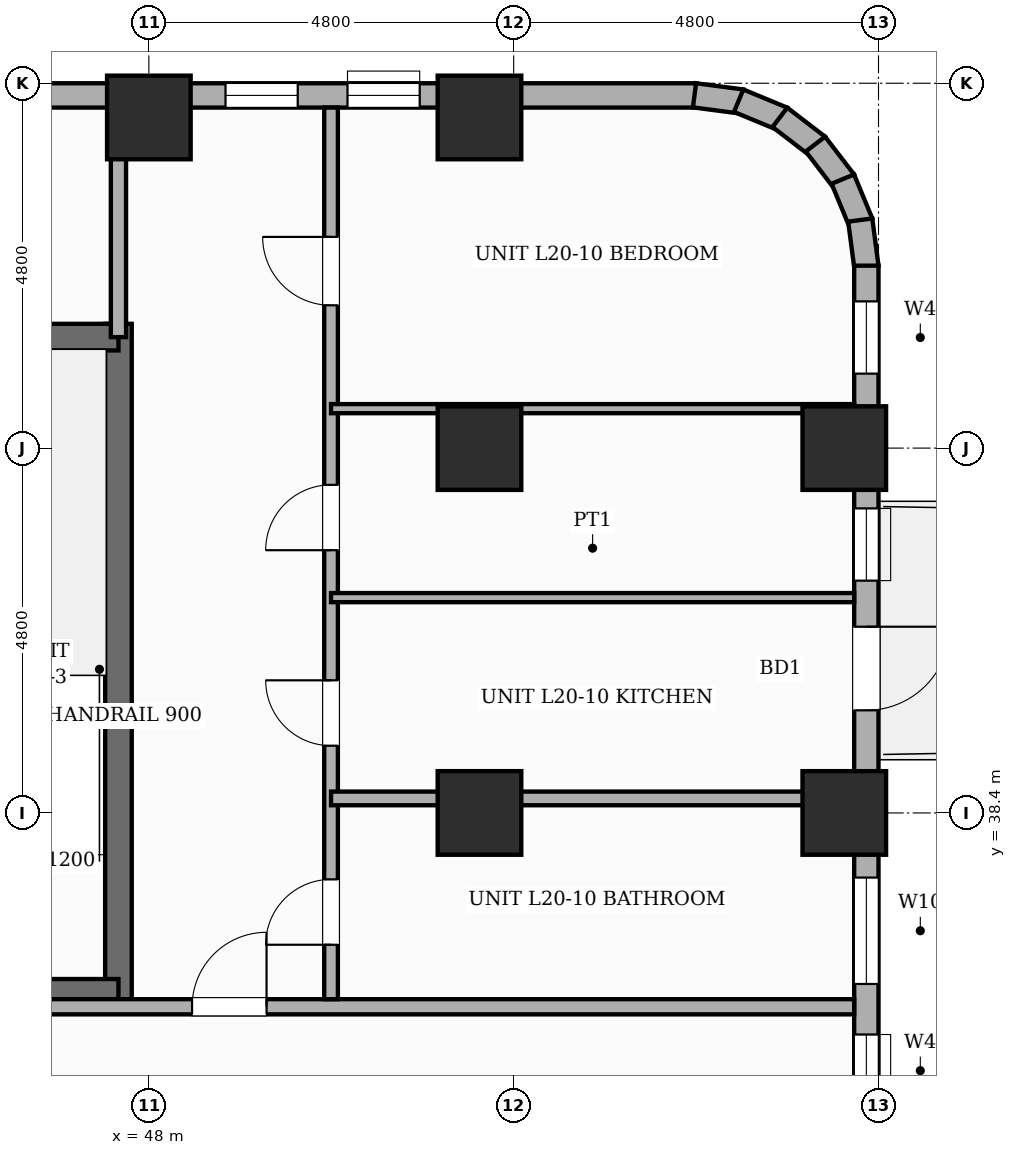
"""IFC4 building model, lengths in metres.
Left out: names, types, materials, properties, quantities, classifications, styles, units other than length and angle.
Written with IfcOpenShell. Run it as: python <this file> out.ifc"""

import sys

from ifc_helpers import new_model, si_unit, direction, frame, frame_2d, origin, origin_2d, place, context, subcontext, project, spatial, rectangle, extrude, element, fill, save


model = new_model("IFC4")
c1 = context("Model", 3, precision=1e-05, world=origin(), true_north=direction((0.0, 1.0)))
c2 = subcontext(c1, "Body", "Model", "MODEL_VIEW")
j1 = project(units=[si_unit("LENGTHUNIT", "METRE"), si_unit("PLANEANGLEUNIT", "RADIAN")], contexts=[c1])
p1 = place(None, origin())
s1 = spatial("IfcSite", under=j1, at=p1, CompositionType="ELEMENT")
p2 = place(p1, origin())
s2 = spatial("IfcBuilding", under=s1, at=p2, CompositionType="ELEMENT")
p3 = place(p2, frame((0.0, 0.0, 79.0)))
s3 = spatial("IfcBuildingStorey", under=s2, at=p3, CompositionType="ELEMENT", Elevation=79.0)
p4 = place(p3, frame((47.6, 35.865, 0.0), z_axis=(0.0, 0.0, 1.0), x_axis=(0.0, 1.0, 0.0)))
e1 = element("IfcWall", 1, at=p4, inside=s3, PredefinedType="SHEAR", context=c2, shape_type="SweptSolid", body=[
    extrude(rectangle(XDim=8.97, YDim=0.35, at=frame_2d((4.485, 0.0))), origin(), (0.0, 0.0, 1.0), 3.6),
])
for number, where, z_axis, x_axis in (
    (2, (44.02, 36.04, 0.0), (0.0, 0.0, 1.0), (1.0, 0.0, 0.0)),
    (3, (44.02, 44.66, 0.0), (0.0, 0.0, 1.0), (1.0, 0.0, 0.0)),
):
    element("IfcWall", number, at=place(p3, frame(where, z_axis=z_axis, x_axis=x_axis)), inside=s3, PredefinedType="SHEAR", context=c2, shape_type="SweptSolid", body=[
        extrude(rectangle(XDim=3.58, YDim=0.35, at=frame_2d((1.79, 0.0))), origin(), (0.0, 0.0, 1.0), 3.6),
    ])
for number, where, z_axis, x_axis in (
    (4, (48.0, 47.55, 0.0), (0.0, 0.0, 1.0), (1.0, 0.0, 0.0)),
    (5, (52.35, 38.4, 0.0), (0.0, 0.0, 1.0), (1.0, 0.0, 0.0)),
    (6, (52.35, 43.2, 0.0), (0.0, 0.0, 1.0), (1.0, 0.0, 0.0)),
    (7, (52.35, 47.55, 0.0), (0.0, 0.0, 1.0), (1.0, 0.0, 0.0)),
    (8, (57.15, 38.4, 0.0), (0.0, 0.0, 1.0), (1.0, 0.0, 0.0)),
    (9, (57.15, 43.2, 0.0), (0.0, 0.0, 1.0), (1.0, 0.0, 0.0)),
):
    element("IfcColumn", number, at=place(p3, frame(where, z_axis=z_axis, x_axis=x_axis)), inside=s3, PredefinedType="COLUMN", context=c2, shape_type="SweptSolid", body=[
        extrude(rectangle(XDim=1.1, YDim=1.1, at=origin_2d()), origin(), (0.0, 0.0, 1.0), 3.6),
    ])
p5 = place(p3, frame((7.2, 47.84, 0.0), z_axis=(0.0, 0.0, 1.0), x_axis=(1.0, 0.0, 0.0)))
e10 = element("IfcWall", 10, at=p5, inside=s3, PredefinedType="STANDARD", context=c2, shape_type="SweptSolid", body=[
    extrude(rectangle(XDim=48.0, YDim=0.32, at=frame_2d((24.0, 0.0))), origin(), (0.0, 0.0, 1.0), 2.53),
])
p6 = place(p5, frame((24.97, 0.0, 0.45)))
e11 = element("IfcOpeningElement", 11, at=p6, cuts=e10, PredefinedType="OPENING", context=c2, shape_type="SweptSolid", body=[
    extrude(rectangle(XDim=0.6, YDim=1.8, at=frame_2d((0.3, 0.9))), frame((0.0, 0.17, 0.0), z_axis=(0.0, -1.0, 0.0), x_axis=(1.0, 0.0, 0.0)), (0.0, 0.0, 1.0), 0.34),
])
p7 = place(p5, frame((29.44, 0.0, 0.45)))
e12 = element("IfcOpeningElement", 12, at=p7, cuts=e10, PredefinedType="OPENING", context=c2, shape_type="SweptSolid", body=[
    extrude(rectangle(XDim=0.95, YDim=1.8, at=frame_2d((0.475, 0.9))), frame((0.0, 0.17, 0.0), z_axis=(0.0, -1.0, 0.0), x_axis=(1.0, 0.0, 0.0)), (0.0, 0.0, 1.0), 0.34),
])
p8 = place(p5, frame((43.414, 0.0, 0.45)))
e13 = element("IfcOpeningElement", 13, at=p8, cuts=e10, PredefinedType="OPENING", context=c2, shape_type="SweptSolid", body=[
    extrude(rectangle(XDim=0.95, YDim=1.8, at=frame_2d((0.475, 0.9))), frame((0.0, 0.17, 0.0), z_axis=(0.0, -1.0, 0.0), x_axis=(1.0, 0.0, 0.0)), (0.0, 0.0, 1.0), 0.34),
])
p9 = place(p5, frame((18.74, 0.0, 0.45)))
e14 = element("IfcOpeningElement", 14, at=p9, cuts=e10, PredefinedType="OPENING", context=c2, shape_type="SweptSolid", body=[
    extrude(rectangle(XDim=0.95, YDim=1.8, at=frame_2d((0.475, 0.9))), frame((0.0, 0.17, 0.0), z_axis=(0.0, -1.0, 0.0), x_axis=(1.0, 0.0, 0.0)), (0.0, 0.0, 1.0), 0.34),
])
p10 = place(p5, frame((37.825, 0.0, 0.65)))
e15 = element("IfcOpeningElement", 15, at=p10, cuts=e10, PredefinedType="OPENING", context=c2, shape_type="SweptSolid", body=[
    extrude(rectangle(XDim=1.4, YDim=1.1, at=frame_2d((0.7, 0.55))), frame((0.0, 0.17, 0.0), z_axis=(0.0, -1.0, 0.0), x_axis=(1.0, 0.0, 0.0)), (0.0, 0.0, 1.0), 0.34),
])
p11 = place(p5, frame((0.47, 0.0, 0.45)))
e16 = element("IfcOpeningElement", 16, at=p11, cuts=e10, PredefinedType="OPENING", context=c2, shape_type="SweptSolid", body=[
    extrude(rectangle(XDim=0.95, YDim=1.8, at=frame_2d((0.475, 0.9))), frame((0.0, 0.17, 0.0), z_axis=(0.0, -1.0, 0.0), x_axis=(1.0, 0.0, 0.0)), (0.0, 0.0, 1.0), 0.34),
])
p12 = place(p5, frame((5.265, 0.0, 0.45)))
e17 = element("IfcOpeningElement", 17, at=p12, cuts=e10, PredefinedType="OPENING", context=c2, shape_type="SweptSolid", body=[
    extrude(rectangle(XDim=0.95, YDim=1.8, at=frame_2d((0.475, 0.9))), frame((0.0, 0.17, 0.0), z_axis=(0.0, -1.0, 0.0), x_axis=(1.0, 0.0, 0.0)), (0.0, 0.0, 1.0), 0.34),
])
p13 = place(p5, frame((22.87, 0.0, 0.65)))
e18 = element("IfcOpeningElement", 18, at=p13, cuts=e10, PredefinedType="OPENING", context=c2, shape_type="SweptSolid", body=[
    extrude(rectangle(XDim=1.4, YDim=1.1, at=frame_2d((0.7, 0.55))), frame((0.0, 0.17, 0.0), z_axis=(0.0, -1.0, 0.0), x_axis=(1.0, 0.0, 0.0)), (0.0, 0.0, 1.0), 0.34),
])
p14 = place(p5, frame((32.81, 0.0, 0.65)))
e19 = element("IfcOpeningElement", 19, at=p14, cuts=e10, PredefinedType="OPENING", context=c2, shape_type="SweptSolid", body=[
    extrude(rectangle(XDim=1.4, YDim=1.1, at=frame_2d((0.7, 0.55))), frame((0.0, 0.17, 0.0), z_axis=(0.0, -1.0, 0.0), x_axis=(1.0, 0.0, 0.0)), (0.0, 0.0, 1.0), 0.34),
])
p15 = place(p5, frame((41.809, 0.0, 0.45)))
e20 = element("IfcOpeningElement", 20, at=p15, cuts=e10, PredefinedType="OPENING", context=c2, shape_type="SweptSolid", body=[
    extrude(rectangle(XDim=0.95, YDim=1.8, at=frame_2d((0.475, 0.9))), frame((0.0, 0.17, 0.0), z_axis=(0.0, -1.0, 0.0), x_axis=(1.0, 0.0, 0.0)), (0.0, 0.0, 1.0), 0.34),
])
for number, where, z_axis, x_axis in (
    (21, (55.179, 47.841, 0.0), (0.0, 0.0, 1.0), (0.991, -0.131, 0.0)),
    (22, (55.76, 47.771, 0.0), (0.0, 0.0, 1.0), (0.924, -0.383, 0.0)),
):
    element("IfcWall", number, at=place(p3, frame(where, z_axis=z_axis, x_axis=x_axis)), inside=s3, PredefinedType="STANDARD", context=c2, shape_type="SweptSolid", body=[
        extrude(rectangle(XDim=0.626, YDim=0.32, at=frame_2d((0.313, 0.0))), origin(), (0.0, 0.0, 1.0), 3.35),
    ])
p16 = place(p3, frame((56.302, 47.552, 0.0), z_axis=(0.0, 0.0, 1.0), x_axis=(0.793549926411, -0.608505147302, 0.0)))
e23 = element("IfcWall", 23, at=p16, inside=s3, PredefinedType="STANDARD", context=c2, shape_type="SweptSolid", body=[
    extrude(rectangle(XDim=0.627, YDim=0.32, at=frame_2d((0.313, 0.0))), origin(), (0.0, 0.0, 1.0), 3.35),
])
for number, where, z_axis, x_axis in (
    (24, (56.77, 47.2, 0.0), (0.0, 0.0, 1.0), (0.609, -0.793, 0.0)),
    (25, (57.131, 46.739, 0.0), (0.0, 0.0, 1.0), (0.383, -0.924, 0.0)),
    (26, (57.36, 46.2, 0.0), (0.0, 0.0, 1.0), (0.131, -0.991, 0.0)),
):
    element("IfcWall", number, at=place(p3, frame(where, z_axis=z_axis, x_axis=x_axis)), inside=s3, PredefinedType="STANDARD", context=c2, shape_type="SweptSolid", body=[
        extrude(rectangle(XDim=0.626, YDim=0.32, at=frame_2d((0.313, 0.0))), origin(), (0.0, 0.0, 1.0), 3.35),
    ])
p17 = place(p3, frame((57.44, 45.6, 0.0), z_axis=(0.0, 0.0, 1.0), x_axis=(0.0, -1.0, 0.0)))
e27 = element("IfcWall", 27, at=p17, inside=s3, PredefinedType="STANDARD", context=c2, shape_type="SweptSolid", body=[
    extrude(rectangle(XDim=14.4, YDim=0.32, at=frame_2d((7.2, 0.0))), origin(), (0.0, 0.0, 1.0), 2.53),
])
p18 = place(p17, frame((4.75, 0.0, 0.0)))
e28 = element("IfcOpeningElement", 28, at=p18, cuts=e27, PredefinedType="OPENING", context=c2, shape_type="SweptSolid", body=[
    extrude(rectangle(XDim=1.1, YDim=2.15, at=frame_2d((0.55, 1.075))), frame((0.0, 0.17, 0.0), z_axis=(0.0, -1.0, 0.0), x_axis=(1.0, 0.0, 0.0)), (0.0, 0.0, 1.0), 0.34),
])
p19 = place(p17, frame((0.47, 0.0, 0.45)))
e29 = element("IfcOpeningElement", 29, at=p19, cuts=e27, PredefinedType="OPENING", context=c2, shape_type="SweptSolid", body=[
    extrude(rectangle(XDim=0.95, YDim=1.8, at=frame_2d((0.475, 0.9))), frame((0.0, 0.17, 0.0), z_axis=(0.0, -1.0, 0.0), x_axis=(1.0, 0.0, 0.0)), (0.0, 0.0, 1.0), 0.34),
])
p20 = place(p17, frame((10.115, 0.0, 0.45)))
e30 = element("IfcOpeningElement", 30, at=p20, cuts=e27, PredefinedType="OPENING", context=c2, shape_type="SweptSolid", body=[
    extrude(rectangle(XDim=0.95, YDim=1.8, at=frame_2d((0.475, 0.9))), frame((0.0, 0.17, 0.0), z_axis=(0.0, -1.0, 0.0), x_axis=(1.0, 0.0, 0.0)), (0.0, 0.0, 1.0), 0.34),
])
p21 = place(p17, frame((12.867, 0.0, 0.45)))
e31 = element("IfcOpeningElement", 31, at=p21, cuts=e27, PredefinedType="OPENING", context=c2, shape_type="SweptSolid", body=[
    extrude(rectangle(XDim=0.95, YDim=1.8, at=frame_2d((0.475, 0.9))), frame((0.0, 0.17, 0.0), z_axis=(0.0, -1.0, 0.0), x_axis=(1.0, 0.0, 0.0)), (0.0, 0.0, 1.0), 0.34),
])
p22 = place(p17, frame((8.05, 0.0, 0.65)))
e32 = element("IfcOpeningElement", 32, at=p22, cuts=e27, PredefinedType="OPENING", context=c2, shape_type="SweptSolid", body=[
    extrude(rectangle(XDim=1.4, YDim=1.1, at=frame_2d((0.7, 0.55))), frame((0.0, 0.17, 0.0), z_axis=(0.0, -1.0, 0.0), x_axis=(1.0, 0.0, 0.0)), (0.0, 0.0, 1.0), 0.34),
])
p23 = place(p17, frame((3.194, 0.0, 0.45)))
e33 = element("IfcOpeningElement", 33, at=p23, cuts=e27, PredefinedType="OPENING", context=c2, shape_type="SweptSolid", body=[
    extrude(rectangle(XDim=0.95, YDim=1.8, at=frame_2d((0.475, 0.9))), frame((0.0, 0.17, 0.0), z_axis=(0.0, -1.0, 0.0), x_axis=(1.0, 0.0, 0.0)), (0.0, 0.0, 1.0), 0.34),
])
p24 = place(p3, frame((44.02, 35.85, 0.0), z_axis=(0.0, 0.0, 1.0), x_axis=(1.0, 0.0, 0.0)))
e34 = element("IfcWall", 34, at=p24, inside=s3, PredefinedType="PARTITIONING", context=c2, shape_type="SweptSolid", body=[
    extrude(rectangle(XDim=13.26, YDim=0.2, at=frame_2d((6.63, 0.0))), origin(), (0.0, 0.0, 1.0), 3.35),
])
p25 = place(p24, frame((4.549, 0.0, 0.0)))
e35 = element("IfcOpeningElement", 35, at=p25, cuts=e34, PredefinedType="OPENING", context=c2, shape_type="SweptSolid", body=[
    extrude(rectangle(XDim=0.98, YDim=2.18, at=frame_2d((0.49, 1.09))), frame((0.0, 0.11, 0.0), z_axis=(0.0, -1.0, 0.0), x_axis=(1.0, 0.0, 0.0)), (0.0, 0.0, 1.0), 0.22),
])
p26 = place(p3, frame((50.397, 35.95, 0.0), z_axis=(0.0, 0.0, 1.0), x_axis=(0.0, 1.0, 0.0)))
e36 = element("IfcWall", 36, at=p26, inside=s3, PredefinedType="PLUMBINGWALL", context=c2, shape_type="SweptSolid", body=[
    extrude(rectangle(XDim=11.73, YDim=0.18, at=frame_2d((5.865, 0.0))), origin(), (0.0, 0.0, 1.0), 3.35),
])
p27 = place(p26, frame((0.716, 0.0, 0.0)))
e37 = element("IfcOpeningElement", 37, at=p27, cuts=e36, PredefinedType="OPENING", context=c2, shape_type="SweptSolid", body=[
    extrude(rectangle(XDim=0.86, YDim=2.1, at=frame_2d((0.43, 1.05))), frame((0.0, 0.1, 0.0), z_axis=(0.0, -1.0, 0.0), x_axis=(1.0, 0.0, 0.0)), (0.0, 0.0, 1.0), 0.2),
])
p28 = place(p26, frame((3.335, 0.0, 0.0)))
e38 = element("IfcOpeningElement", 38, at=p28, cuts=e36, PredefinedType="OPENING", context=c2, shape_type="SweptSolid", body=[
    extrude(rectangle(XDim=0.86, YDim=2.1, at=frame_2d((0.43, 1.05))), frame((0.0, 0.1, 0.0), z_axis=(0.0, -1.0, 0.0), x_axis=(1.0, 0.0, 0.0)), (0.0, 0.0, 1.0), 0.2),
])
p29 = place(p26, frame((5.907, 0.0, 0.0)))
e39 = element("IfcOpeningElement", 39, at=p29, cuts=e36, PredefinedType="OPENING", context=c2, shape_type="SweptSolid", body=[
    extrude(rectangle(XDim=0.86, YDim=2.1, at=frame_2d((0.43, 1.05))), frame((0.0, 0.1, 0.0), z_axis=(0.0, -1.0, 0.0), x_axis=(1.0, 0.0, 0.0)), (0.0, 0.0, 1.0), 0.2),
])
p30 = place(p26, frame((9.128, 0.0, 0.0)))
e40 = element("IfcOpeningElement", 40, at=p30, cuts=e36, PredefinedType="OPENING", context=c2, shape_type="SweptSolid", body=[
    extrude(rectangle(XDim=0.9, YDim=2.15, at=frame_2d((0.45, 1.075))), frame((0.0, 0.1, 0.0), z_axis=(0.0, -1.0, 0.0), x_axis=(1.0, 0.0, 0.0)), (0.0, 0.0, 1.0), 0.2),
])
p31 = place(p3, frame((50.397, 38.591, 0.0), z_axis=(0.0, 0.0, 1.0), x_axis=(1.0, 0.0, 0.0)))
e41 = element("IfcWall", 41, at=p31, inside=s3, PredefinedType="PLUMBINGWALL", context=c2, shape_type="SweptSolid", body=[
    extrude(rectangle(XDim=6.883, YDim=0.18, at=frame_2d((3.441, 0.0))), origin(), (0.0, 0.0, 1.0), 2.53),
])
for number, where, z_axis, x_axis in (
    (42, (50.397, 41.233, 0.0), (0.0, 0.0, 1.0), (1.0, 0.0, 0.0)),
    (43, (50.397, 43.719, 0.0), (0.0, 0.0, 1.0), (1.0, 0.0, 0.0)),
):
    element("IfcWall", number, at=place(p3, frame(where, z_axis=z_axis, x_axis=x_axis)), inside=s3, PredefinedType="PARTITIONING", context=c2, shape_type="SweptSolid", body=[
        extrude(rectangle(XDim=6.883, YDim=0.12, at=frame_2d((3.441, 0.0))), origin(), (0.0, 0.0, 1.0), 3.35),
    ])
p32 = place(p3, frame((47.6, 44.66, 0.0), z_axis=(0.0, 0.0, 1.0), x_axis=(0.0, 1.0, 0.0)))
e44 = element("IfcWall", 44, at=p32, inside=s3, PredefinedType="SOLIDWALL", context=c2, shape_type="SweptSolid", body=[
    extrude(rectangle(XDim=3.02, YDim=0.2, at=frame_2d((1.51, 0.0))), origin(), (0.0, 0.0, 1.0), 3.35),
])
p33 = place(p8, origin())
e45 = element("IfcWindow", 45, at=p33, inside=s3, PartitioningType="SINGLE_PANEL", PredefinedType="WINDOW", context=c2, shape_type="SweptSolid", body=[
    extrude(rectangle(XDim=0.95, YDim=1.8, at=frame_2d((0.475, 0.9))), frame((0.0, 0.03, 0.0), z_axis=(0.0, -1.0, 0.0), x_axis=(1.0, 0.0, 0.0)), (0.0, 0.0, 1.0), 0.06),
])
fill(e13, e45)
p34 = place(p15, origin())
e46 = element("IfcWindow", 46, at=p34, inside=s3, PartitioningType="SINGLE_PANEL", PredefinedType="WINDOW", context=c2, shape_type="SweptSolid", body=[
    extrude(rectangle(XDim=0.95, YDim=1.8, at=frame_2d((0.475, 0.9))), frame((0.0, 0.03, 0.0), z_axis=(0.0, -1.0, 0.0), x_axis=(1.0, 0.0, 0.0)), (0.0, 0.0, 1.0), 0.06),
])
fill(e20, e46)
p35 = place(p18, origin())
e47 = element("IfcDoor", 47, at=p35, inside=s3, OperationType="SINGLE_SWING_LEFT", PredefinedType="DOOR", context=c2, shape_type="SweptSolid", body=[
    extrude(rectangle(XDim=1.1, YDim=2.15, at=frame_2d((0.55, 1.075))), frame((0.0, 0.025, 0.0), z_axis=(0.0, -1.0, 0.0), x_axis=(1.0, 0.0, 0.0)), (0.0, 0.0, 1.0), 0.05),
])
fill(e28, e47)
p36 = place(p19, origin())
e48 = element("IfcWindow", 48, at=p36, inside=s3, PartitioningType="SINGLE_PANEL", PredefinedType="WINDOW", context=c2, shape_type="SweptSolid", body=[
    extrude(rectangle(XDim=0.95, YDim=1.8, at=frame_2d((0.475, 0.9))), frame((0.0, 0.03, 0.0), z_axis=(0.0, -1.0, 0.0), x_axis=(1.0, 0.0, 0.0)), (0.0, 0.0, 1.0), 0.06),
])
fill(e29, e48)
p37 = place(p20, origin())
e49 = element("IfcWindow", 49, at=p37, inside=s3, PartitioningType="SINGLE_PANEL", PredefinedType="WINDOW", context=c2, shape_type="SweptSolid", body=[
    extrude(rectangle(XDim=0.95, YDim=1.8, at=frame_2d((0.475, 0.9))), frame((0.0, 0.03, 0.0), z_axis=(0.0, -1.0, 0.0), x_axis=(1.0, 0.0, 0.0)), (0.0, 0.0, 1.0), 0.06),
])
fill(e30, e49)
p38 = place(p22, origin())
e50 = element("IfcWindow", 50, at=p38, inside=s3, PartitioningType="SINGLE_PANEL", PredefinedType="WINDOW", context=c2, shape_type="SweptSolid", body=[
    extrude(rectangle(XDim=1.4, YDim=1.1, at=frame_2d((0.7, 0.55))), frame((0.0, 0.03, 0.0), z_axis=(0.0, -1.0, 0.0), x_axis=(1.0, 0.0, 0.0)), (0.0, 0.0, 1.0), 0.06),
])
fill(e32, e50)
p39 = place(p23, origin())
e51 = element("IfcWindow", 51, at=p39, inside=s3, PartitioningType="SINGLE_PANEL", PredefinedType="WINDOW", context=c2, shape_type="SweptSolid", body=[
    extrude(rectangle(XDim=0.95, YDim=1.8, at=frame_2d((0.475, 0.9))), frame((0.0, 0.03, 0.0), z_axis=(0.0, -1.0, 0.0), x_axis=(1.0, 0.0, 0.0)), (0.0, 0.0, 1.0), 0.06),
])
fill(e33, e51)
p40 = place(p25, origin())
e52 = element("IfcDoor", 52, at=p40, inside=s3, OperationType="SINGLE_SWING_RIGHT", PredefinedType="DOOR", context=c2, shape_type="SweptSolid", body=[
    extrude(rectangle(XDim=0.98, YDim=2.18, at=frame_2d((0.49, 1.09))), frame((0.0, 0.025, 0.0), z_axis=(0.0, -1.0, 0.0), x_axis=(1.0, 0.0, 0.0)), (0.0, 0.0, 1.0), 0.05),
])
fill(e35, e52)
p41 = place(p27, origin())
e53 = element("IfcDoor", 53, at=p41, inside=s3, OperationType="SINGLE_SWING_LEFT", PredefinedType="DOOR", context=c2, shape_type="SweptSolid", body=[
    extrude(rectangle(XDim=0.86, YDim=2.1, at=frame_2d((0.43, 1.05))), frame((0.0, 0.025, 0.0), z_axis=(0.0, -1.0, 0.0), x_axis=(1.0, 0.0, 0.0)), (0.0, 0.0, 1.0), 0.05),
])
fill(e37, e53)
p42 = place(p28, origin())
e54 = element("IfcDoor", 54, at=p42, inside=s3, OperationType="SINGLE_SWING_RIGHT", PredefinedType="DOOR", context=c2, shape_type="SweptSolid", body=[
    extrude(rectangle(XDim=0.86, YDim=2.1, at=frame_2d((0.43, 1.05))), frame((0.0, 0.025, 0.0), z_axis=(0.0, -1.0, 0.0), x_axis=(1.0, 0.0, 0.0)), (0.0, 0.0, 1.0), 0.05),
])
fill(e38, e54)
p43 = place(p29, origin())
e55 = element("IfcDoor", 55, at=p43, inside=s3, OperationType="SINGLE_SWING_LEFT", PredefinedType="DOOR", context=c2, shape_type="SweptSolid", body=[
    extrude(rectangle(XDim=0.86, YDim=2.1, at=frame_2d((0.43, 1.05))), frame((0.0, 0.025, 0.0), z_axis=(0.0, -1.0, 0.0), x_axis=(1.0, 0.0, 0.0)), (0.0, 0.0, 1.0), 0.05),
])
fill(e39, e55)
p44 = place(p30, origin())
e56 = element("IfcDoor", 56, at=p44, inside=s3, OperationType="SINGLE_SWING_RIGHT", PredefinedType="DOOR", context=c2, shape_type="SweptSolid", body=[
    extrude(rectangle(XDim=0.9, YDim=2.15, at=frame_2d((0.45, 1.075))), frame((0.0, 0.025, 0.0), z_axis=(0.0, -1.0, 0.0), x_axis=(1.0, 0.0, 0.0)), (0.0, 0.0, 1.0), 0.05),
])
fill(e40, e56)
save(model, sys.argv[1])
